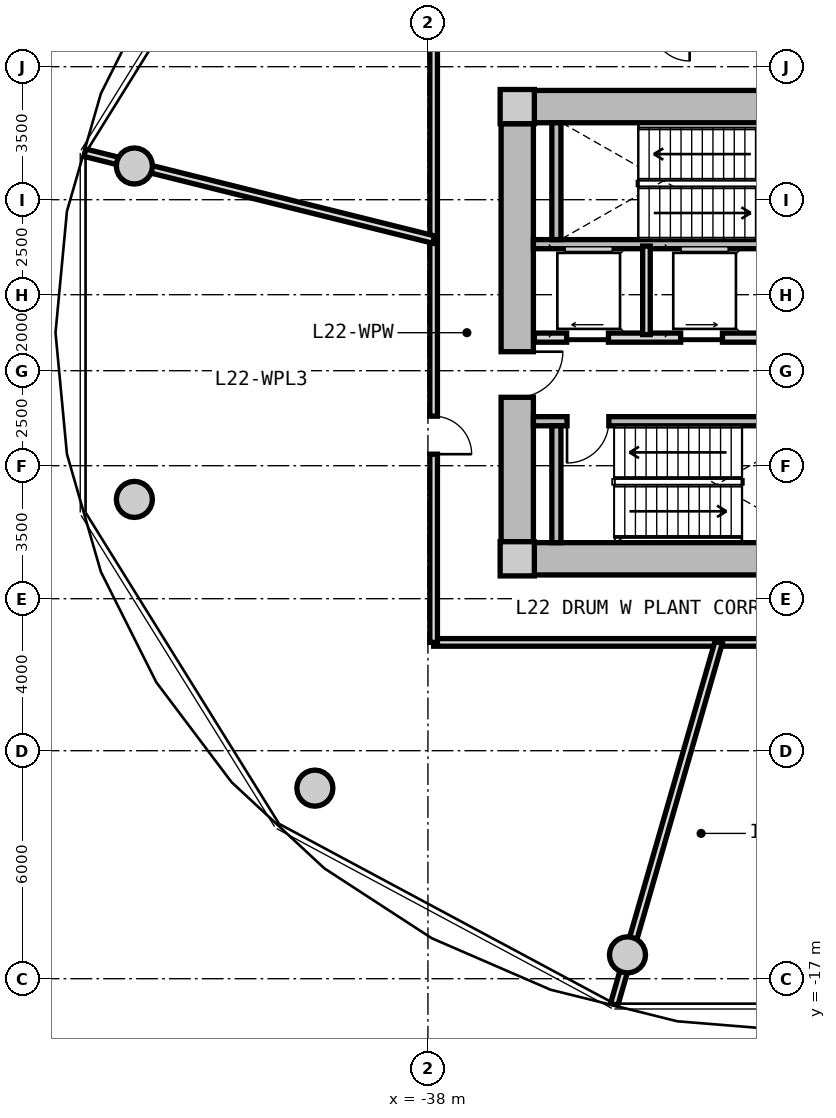
"""IFC4 building model, lengths in metres.
Left out: names, types, materials, properties, quantities, classifications, styles, units other than length and angle.
Written with IfcOpenShell. Run it as: python <this file> out.ifc"""

import sys

from ifc_helpers import new_model, si_unit, direction, frame, frame_2d, origin, origin_2d, place, context, subcontext, project, spatial, rectangle, circle, extrude, source, transform, mapped, element, fill, save


model = new_model("IFC4")
c1 = context("Model", 3, precision=1e-05, world=origin(), true_north=direction((0.0, 1.0)))
c2 = subcontext(c1, "Body", "Model", "MODEL_VIEW")
j1 = project(units=[si_unit("LENGTHUNIT", "METRE"), si_unit("PLANEANGLEUNIT", "RADIAN")], contexts=[c1])
p1 = place(None, origin())
s1 = spatial("IfcSite", under=j1, at=p1, CompositionType="ELEMENT")
p2 = place(p1, origin())
s2 = spatial("IfcBuilding", under=s1, at=p2, CompositionType="ELEMENT")
p3 = place(p2, frame((0.0, 0.0, 73.45)))
s3 = spatial("IfcBuildingStorey", under=s2, at=p3, CompositionType="ELEMENT", Elevation=73.45)
m1 = source(origin(), c2, "Body", "SweptSolid", [
    extrude(rectangle(XDim=0.9, YDim=0.9, at=origin_2d()), origin(), (0.0, 0.0, 1.0), 4.5),
])
for number, where, z_axis, x_axis in (
    (1, (-35.65, -5.95, 0.0), (0.0, 0.0, 1.0), (1.0, 0.0, 0.0)),
    (2, (-35.65, 5.95, 0.0), (0.0, 0.0, 1.0), (1.0, 0.0, 0.0)),
):
    element("IfcColumn", number, at=place(p3, frame(where, z_axis=z_axis, x_axis=x_axis)), inside=s3, PredefinedType="COLUMN", context=c2, shape_type="MappedRepresentation", body=[
        mapped(m1, transform((0.0, 0.0, 0.0), x_axis=(1.0, 0.0, 0.0), y_axis=(0.0, 1.0, 0.0), z_axis=(0.0, 0.0, 1.0), scale=1.0)),
    ])
m2 = source(origin(), c2, "Body", "SweptSolid", [
    extrude(rectangle(XDim=14.4, YDim=0.85, at=frame_2d((7.2, 0.0))), origin(), (0.0, 0.0, 1.0), 4.08),
])
for number, where, z_axis, x_axis in (
    (3, (-35.2, 5.95, 0.0), (0.0, 0.0, 1.0), (1.0, 0.0, 0.0)),
    (4, (-20.8, -5.95, 0.0), (0.0, 0.0, 1.0), (-1.0, 0.0, 0.0)),
):
    element("IfcWall", number, at=place(p3, frame(where, z_axis=z_axis, x_axis=x_axis)), inside=s3, PredefinedType="SHEAR", context=c2, shape_type="MappedRepresentation", body=[
        mapped(m2, transform((0.0, 0.0, 0.0), x_axis=(1.0, 0.0, 0.0), y_axis=(0.0, 1.0, 0.0), z_axis=(0.0, 0.0, 1.0), scale=1.0)),
    ])
m3 = source(origin(), c2, "Body", "SweptSolid", [
    extrude(rectangle(XDim=11.0, YDim=0.85, at=frame_2d((5.5, 0.0))), origin(), (0.0, 0.0, 1.0), 4.08),
])
p4 = place(p3, frame((-35.65, -5.5, 0.0), z_axis=(0.0, 0.0, 1.0), x_axis=(0.0, 1.0, 0.0)))
e5 = element("IfcWall", 5, at=p4, inside=s3, PredefinedType="SHEAR", context=c2, shape_type="MappedRepresentation", body=[
    mapped(m3, transform((0.0, 0.0, 0.0), x_axis=(1.0, 0.0, 0.0), y_axis=(0.0, 1.0, 0.0), z_axis=(0.0, 0.0, 1.0), scale=1.0)),
])
p5 = place(p4, frame((3.8, 0.0, 0.0)))
e6 = element("IfcOpeningElement", 6, at=p5, cuts=e5, PredefinedType="OPENING", context=c2, shape_type="SweptSolid", body=[
    extrude(rectangle(XDim=1.2, YDim=2.15, at=frame_2d((0.6, 1.075))), frame((0.0, 0.435, 0.0), z_axis=(0.0, -1.0, 0.0), x_axis=(1.0, 0.0, 0.0)), (0.0, 0.0, 1.0), 0.87),
])
m4 = source(origin(), c2, "Body", "SweptSolid", [
    extrude(circle(Radius=0.475, at=origin_2d()), origin(), (0.0, 0.0, 1.0), 4.08),
])
for number, where, z_axis, x_axis in (
    (7, (-45.725, 4.387, 0.0), (0.0, 0.0, 1.0), (1.0, 0.0, 0.0)),
    (8, (-45.725, -4.387, 0.0), (0.0, 0.0, 1.0), (1.0, 0.0, 0.0)),
    (9, (-40.975, -11.985, 0.0), (0.0, 0.0, 1.0), (1.0, 0.0, 0.0)),
    (10, (-32.749, -16.373, 0.0), (0.0, 0.0, 1.0), (1.0, 0.0, 0.0)),
):
    element("IfcColumn", number, at=place(p3, frame(where, z_axis=z_axis, x_axis=x_axis)), inside=s3, PredefinedType="COLUMN", context=c2, shape_type="MappedRepresentation", body=[
        mapped(m4, transform((0.0, 0.0, 0.0), x_axis=(1.0, 0.0, 0.0), y_axis=(0.0, 1.0, 0.0), z_axis=(0.0, 0.0, 1.0), scale=1.0)),
    ])
m5 = source(origin(), c2, "Body", "SweptSolid", [
    extrude(rectangle(XDim=7.765, YDim=0.24, at=frame_2d((3.883, 0.0))), origin(), (0.0, 0.0, 1.0), 4.08),
])
p6 = place(p3, frame((-35.225, 2.33, 0.0), z_axis=(0.0, 0.0, 1.0), x_axis=(1.0, 0.0, 0.0)))
e11 = element("IfcWall", 11, at=p6, inside=s3, PredefinedType="PARTITIONING", context=c2, shape_type="MappedRepresentation", body=[
    mapped(m5, transform((0.0, 0.0, 0.0), x_axis=(1.0, 0.0, 0.0), y_axis=(0.0, 1.0, 0.0), z_axis=(0.0, 0.0, 1.0), scale=1.0)),
])
m6 = source(origin(), c2, "Body", "SweptSolid", [
    extrude(rectangle(XDim=3.075, YDim=0.24, at=frame_2d((1.538, 0.0))), origin(), (0.0, 0.0, 1.0), 4.08),
])
p7 = place(p3, frame((-34.62, 2.45, 0.0), z_axis=(0.0, 0.0, 1.0), x_axis=(0.0, 1.0, 0.0)))
e12 = element("IfcWall", 12, at=p7, inside=s3, PredefinedType="PARTITIONING", context=c2, shape_type="MappedRepresentation", body=[
    mapped(m6, transform((0.0, 0.0, 0.0), x_axis=(1.0, 0.0, 0.0), y_axis=(0.0, 1.0, 0.0), z_axis=(0.0, 0.0, 1.0), scale=1.0)),
])
p8 = place(p3, frame((-35.225, -2.33, 0.0), z_axis=(0.0, 0.0, 1.0), x_axis=(1.0, 0.0, 0.0)))
e13 = element("IfcWall", 13, at=p8, inside=s3, PredefinedType="PARTITIONING", context=c2, shape_type="MappedRepresentation", body=[
    mapped(m5, transform((0.0, 0.0, 0.0), x_axis=(1.0, 0.0, 0.0), y_axis=(0.0, 1.0, 0.0), z_axis=(0.0, 0.0, 1.0), scale=1.0)),
])
p9 = place(p8, frame((0.885, 0.0, 0.0)))
e14 = element("IfcOpeningElement", 14, at=p9, cuts=e13, PredefinedType="OPENING", context=c2, shape_type="SweptSolid", body=[
    extrude(rectangle(XDim=1.1, YDim=2.15, at=frame_2d((0.55, 1.075))), frame((0.0, 0.13, 0.0), z_axis=(0.0, -1.0, 0.0), x_axis=(1.0, 0.0, 0.0)), (0.0, 0.0, 1.0), 0.26),
])
p10 = place(p3, frame((-34.62, -5.525, 0.0), z_axis=(0.0, 0.0, 1.0), x_axis=(0.0, 1.0, 0.0)))
e15 = element("IfcWall", 15, at=p10, inside=s3, PredefinedType="PARTITIONING", context=c2, shape_type="MappedRepresentation", body=[
    mapped(m6, transform((0.0, 0.0, 0.0), x_axis=(1.0, 0.0, 0.0), y_axis=(0.0, 1.0, 0.0), z_axis=(0.0, 0.0, 1.0), scale=1.0)),
])
m7 = source(origin(), c2, "Body", "SweptSolid", [
    extrude(rectangle(XDim=7.62, YDim=0.24, at=frame_2d((3.81, 0.0))), origin(), (0.0, 0.0, 1.0), 4.065),
])
p11 = place(p3, frame((-35.2, -0.13, 0.0), z_axis=(0.0, 0.0, 1.0), x_axis=(1.0, 0.0, 0.0)))
e16 = element("IfcWall", 16, at=p11, inside=s3, PredefinedType="PARTITIONING", context=c2, shape_type="MappedRepresentation", body=[
    mapped(m7, transform((0.0, 0.0, 0.0), x_axis=(1.0, 0.0, 0.0), y_axis=(0.0, 1.0, 0.0), z_axis=(0.0, 0.0, 1.0), scale=1.0)),
])
p12 = place(p11, frame((6.22, 0.0, 0.0)))
e17 = element("IfcOpeningElement", 17, at=p12, cuts=e16, PredefinedType="OPENING", context=c2, shape_type="SweptSolid", body=[
    extrude(rectangle(XDim=1.0, YDim=2.1, at=frame_2d((0.5, 1.05))), frame((0.0, 0.13, 0.0), z_axis=(0.0, -1.0, 0.0), x_axis=(1.0, 0.0, 0.0)), (0.0, 0.0, 1.0), 0.26),
])
p13 = place(p11, frame((0.85, 0.0, 0.0)))
e18 = element("IfcOpeningElement", 18, at=p13, cuts=e16, PredefinedType="OPENING", context=c2, shape_type="SweptSolid", body=[
    extrude(rectangle(XDim=1.1, YDim=2.2, at=frame_2d((0.55, 1.1))), frame((0.0, 0.13, 0.0), z_axis=(0.0, -1.0, 0.0), x_axis=(1.0, 0.0, 0.0)), (0.0, 0.0, 1.0), 0.26),
])
p14 = place(p11, frame((3.85, 0.0, 0.0)))
e19 = element("IfcOpeningElement", 19, at=p14, cuts=e16, PredefinedType="OPENING", context=c2, shape_type="SweptSolid", body=[
    extrude(rectangle(XDim=1.1, YDim=2.2, at=frame_2d((0.55, 1.1))), frame((0.0, 0.13, 0.0), z_axis=(0.0, -1.0, 0.0), x_axis=(1.0, 0.0, 0.0)), (0.0, 0.0, 1.0), 0.26),
])
m8 = source(origin(), c2, "Body", "SweptSolid", [
    extrude(rectangle(XDim=2.33, YDim=0.2, at=frame_2d((1.165, 0.0))), origin(), (0.0, 0.0, 1.0), 4.065),
])
p15 = place(p3, frame((-32.25, -0.05, 0.0), z_axis=(0.0, 0.0, 1.0), x_axis=(0.0, 1.0, 0.0)))
e20 = element("IfcWall", 20, at=p15, inside=s3, PredefinedType="PARTITIONING", context=c2, shape_type="MappedRepresentation", body=[
    mapped(m8, transform((0.0, 0.0, 0.0), x_axis=(1.0, 0.0, 0.0), y_axis=(0.0, 1.0, 0.0), z_axis=(0.0, 0.0, 1.0), scale=1.0)),
])
m9 = source(origin(), c2, "Body", "SweptSolid", [
    extrude(rectangle(XDim=19.7, YDim=0.2, at=frame_2d((9.85, 0.0))), origin(), (0.0, 0.0, 1.0), 4.065),
])
p16 = place(p3, frame((-18.15, -8.15, 0.0), z_axis=(0.0, 0.0, 1.0), x_axis=(-1.0, 0.0, 0.0)))
e21 = element("IfcWall", 21, at=p16, inside=s3, PredefinedType="PARTITIONING", context=c2, shape_type="MappedRepresentation", body=[
    mapped(m9, transform((0.0, 0.0, 0.0), x_axis=(1.0, 0.0, 0.0), y_axis=(0.0, 1.0, 0.0), z_axis=(0.0, 0.0, 1.0), scale=1.0)),
])
p17 = place(p16, frame((5.612, 0.0, 0.0)))
e22 = element("IfcOpeningElement", 22, at=p17, cuts=e21, PredefinedType="OPENING", context=c2, shape_type="SweptSolid", body=[
    extrude(rectangle(XDim=1.25, YDim=2.2, at=frame_2d((0.625, 1.1))), frame((0.0, 0.11, 0.0), z_axis=(0.0, -1.0, 0.0), x_axis=(1.0, 0.0, 0.0)), (0.0, 0.0, 1.0), 0.22),
])
m10 = source(origin(), c2, "Body", "SweptSolid", [
    extrude(rectangle(XDim=16.3, YDim=0.2, at=frame_2d((8.15, 0.0))), origin(), (0.0, 0.0, 1.0), 4.065),
])
p18 = place(p3, frame((-37.85, -8.15, 0.0), z_axis=(0.0, 0.0, 1.0), x_axis=(0.0, 1.0, 0.0)))
e23 = element("IfcWall", 23, at=p18, inside=s3, PredefinedType="PARTITIONING", context=c2, shape_type="MappedRepresentation", body=[
    mapped(m10, transform((0.0, 0.0, 0.0), x_axis=(1.0, 0.0, 0.0), y_axis=(0.0, 1.0, 0.0), z_axis=(0.0, 0.0, 1.0), scale=1.0)),
])
p19 = place(p18, frame((4.953, 0.0, 0.0)))
e24 = element("IfcOpeningElement", 24, at=p19, cuts=e23, PredefinedType="OPENING", context=c2, shape_type="SweptSolid", body=[
    extrude(rectangle(XDim=1.0, YDim=2.1, at=frame_2d((0.5, 1.05))), frame((0.0, 0.11, 0.0), z_axis=(0.0, -1.0, 0.0), x_axis=(1.0, 0.0, 0.0)), (0.0, 0.0, 1.0), 0.22),
])
m11 = source(origin(), c2, "Body", "SweptSolid", [
    extrude(rectangle(XDim=9.915, YDim=0.2, at=frame_2d((4.958, 0.0))), origin(), (0.0, 0.0, 1.0), 4.065),
])
p20 = place(p3, frame((-30.351, -8.15, 0.0), z_axis=(0.0, 0.0, 1.0), x_axis=(-0.277136607861, -0.960830526463, 0.0)))
e25 = element("IfcWall", 25, at=p20, inside=s3, PredefinedType="PARTITIONING", context=c2, shape_type="MappedRepresentation", body=[
    mapped(m11, transform((0.0, 0.0, 0.0), x_axis=(1.0, 0.0, 0.0), y_axis=(0.0, 1.0, 0.0), z_axis=(0.0, 0.0, 1.0), scale=1.0)),
])
m12 = source(origin(), c2, "Body", "SweptSolid", [
    extrude(rectangle(XDim=9.459, YDim=0.2, at=frame_2d((4.729, 0.0))), origin(), (0.0, 0.0, 1.0), 2.515),
])
p21 = place(p3, frame((-37.85, 2.452, 0.0), z_axis=(0.0, 0.0, 1.0), x_axis=(-0.970390989268, 0.241539495626, 0.0)))
e26 = element("IfcWall", 26, at=p21, inside=s3, PredefinedType="PARTITIONING", context=c2, shape_type="MappedRepresentation", body=[
    mapped(m12, transform((0.0, 0.0, 0.0), x_axis=(1.0, 0.0, 0.0), y_axis=(0.0, 1.0, 0.0), z_axis=(0.0, 0.0, 1.0), scale=1.0)),
])
m13 = source(origin(), c2, "Body", "SweptSolid", [
    extrude(rectangle(XDim=1.1, YDim=2.15, at=frame_2d((0.55, 1.075))), frame((0.0, 0.025, 0.0), z_axis=(0.0, -1.0, 0.0), x_axis=(1.0, 0.0, 0.0)), (0.0, 0.0, 1.0), 0.05),
])
p22 = place(p9, frame((1.1, 0.0, 0.0), z_axis=(0.0, 0.0, 1.0), x_axis=(-1.0, 0.0, 0.0)))
e27 = element("IfcDoor", 27, at=p22, inside=s3, OperationType="SINGLE_SWING_RIGHT", PredefinedType="DOOR", context=c2, shape_type="MappedRepresentation", body=[
    mapped(m13, transform((0.0, 0.0, 0.0), x_axis=(1.0, 0.0, 0.0), y_axis=(0.0, 1.0, 0.0), z_axis=(0.0, 0.0, 1.0), scale=1.0)),
])
fill(e14, e27)
m14 = source(origin(), c2, "Body", "SweptSolid", [
    extrude(rectangle(XDim=1.2, YDim=2.15, at=frame_2d((0.6, 1.075))), frame((0.0, 0.025, 0.0), z_axis=(0.0, -1.0, 0.0), x_axis=(1.0, 0.0, 0.0)), (0.0, 0.0, 1.0), 0.05),
])
p23 = place(p5, frame((1.2, 0.0, 0.0), z_axis=(0.0, 0.0, 1.0), x_axis=(-1.0, 0.0, 0.0)))
e28 = element("IfcDoor", 28, at=p23, inside=s3, OperationType="SINGLE_SWING_LEFT", PredefinedType="DOOR", context=c2, shape_type="MappedRepresentation", body=[
    mapped(m14, transform((0.0, 0.0, 0.0), x_axis=(1.0, 0.0, 0.0), y_axis=(0.0, 1.0, 0.0), z_axis=(0.0, 0.0, 1.0), scale=1.0)),
])
fill(e6, e28)
m15 = source(origin(), c2, "Body", "SweptSolid", [
    extrude(rectangle(XDim=1.1, YDim=2.2, at=frame_2d((0.55, 1.1))), frame((0.0, 0.025, 0.0), z_axis=(0.0, -1.0, 0.0), x_axis=(1.0, 0.0, 0.0)), (0.0, 0.0, 1.0), 0.05),
])
p24 = place(p13, origin())
e29 = element("IfcDoor", 29, at=p24, inside=s3, OperationType="SLIDING_TO_LEFT", PredefinedType="DOOR", context=c2, shape_type="MappedRepresentation", body=[
    mapped(m15, transform((0.0, 0.0, 0.0), x_axis=(1.0, 0.0, 0.0), y_axis=(0.0, 1.0, 0.0), z_axis=(0.0, 0.0, 1.0), scale=1.0)),
])
fill(e18, e29)
p25 = place(p14, origin())
e30 = element("IfcDoor", 30, at=p25, inside=s3, OperationType="SLIDING_TO_RIGHT", PredefinedType="DOOR", context=c2, shape_type="MappedRepresentation", body=[
    mapped(m15, transform((0.0, 0.0, 0.0), x_axis=(1.0, 0.0, 0.0), y_axis=(0.0, 1.0, 0.0), z_axis=(0.0, 0.0, 1.0), scale=1.0)),
])
fill(e19, e30)
m16 = source(origin(), c2, "Body", "SweptSolid", [
    extrude(rectangle(XDim=1.0, YDim=2.1, at=frame_2d((0.5, 1.05))), frame((0.0, 0.025, 0.0), z_axis=(0.0, -1.0, 0.0), x_axis=(1.0, 0.0, 0.0)), (0.0, 0.0, 1.0), 0.05),
])
p26 = place(p19, frame((1.0, 0.0, 0.0), z_axis=(0.0, 0.0, 1.0), x_axis=(-1.0, 0.0, 0.0)))
e31 = element("IfcDoor", 31, at=p26, inside=s3, OperationType="SINGLE_SWING_RIGHT", PredefinedType="DOOR", context=c2, shape_type="MappedRepresentation", body=[
    mapped(m16, transform((0.0, 0.0, 0.0), x_axis=(1.0, 0.0, 0.0), y_axis=(0.0, 1.0, 0.0), z_axis=(0.0, 0.0, 1.0), scale=1.0)),
])
fill(e24, e31)
save(model, sys.argv[1])
